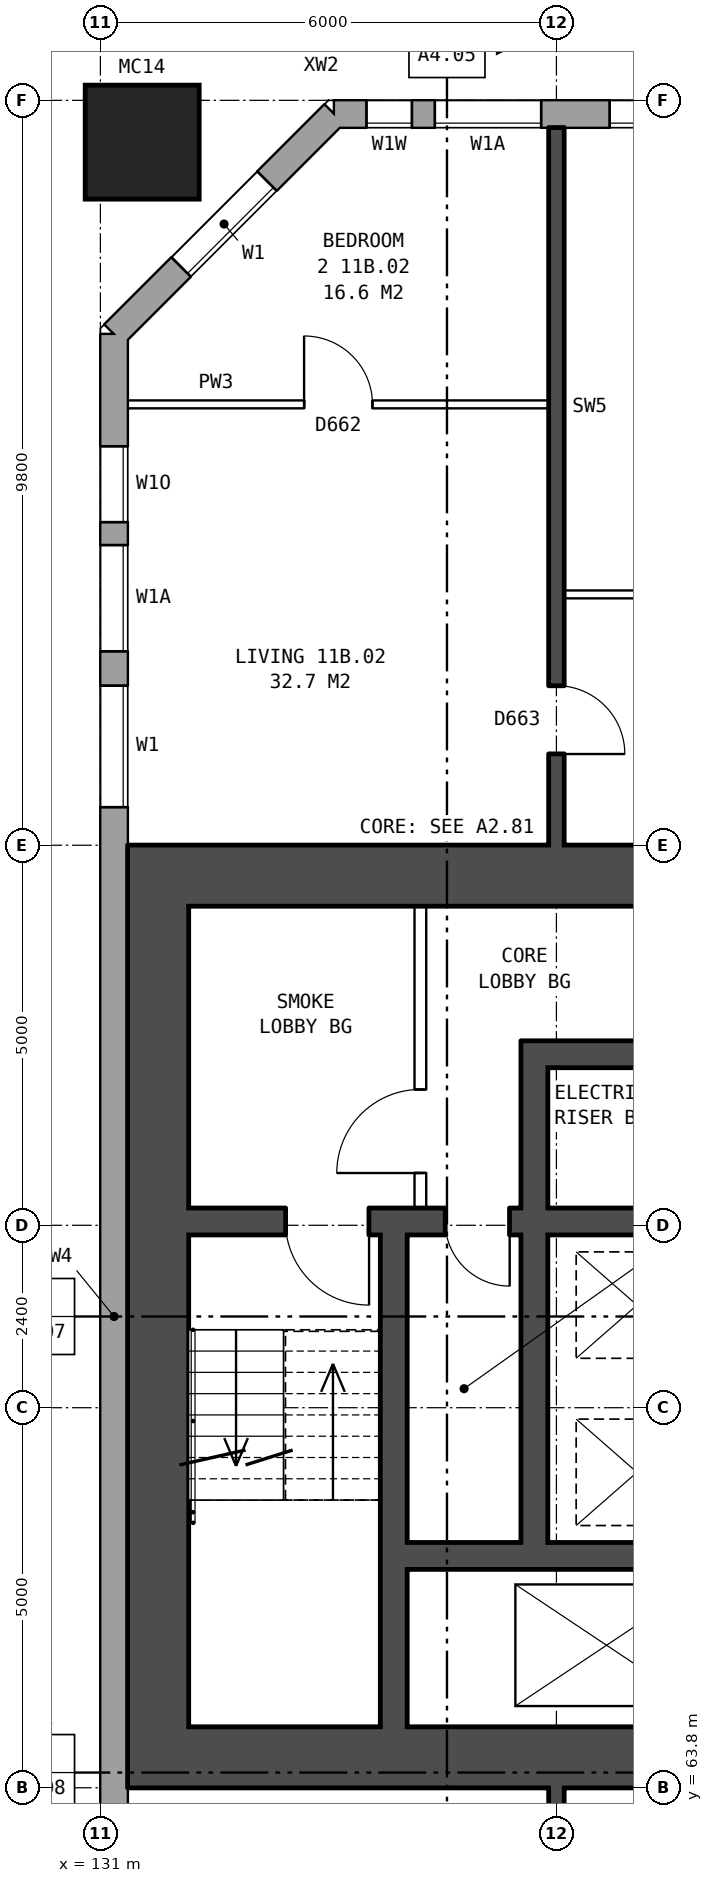
"""IFC4 building model, lengths in metres.
Left out: names, types, materials, properties, quantities, classifications, styles, units other than length and angle.
Written with IfcOpenShell. Run it as: python <this file> out.ifc"""

import sys

from ifc_helpers import new_model, si_unit, direction, frame, frame_2d, origin, origin_2d, place, context, subcontext, project, spatial, rectangle, hollow_rectangle, extrude, element, fill, save


model = new_model("IFC4")
c1 = context("Model", 3, precision=1e-05, world=origin(), true_north=direction((0.0, 1.0)))
c2 = subcontext(c1, "Body", "Model", "MODEL_VIEW")
j1 = project(units=[si_unit("LENGTHUNIT", "METRE"), si_unit("PLANEANGLEUNIT", "RADIAN")], contexts=[c1])
p1 = place(None, origin())
s1 = spatial("IfcSite", under=j1, at=p1, CompositionType="ELEMENT")
p2 = place(p1, origin())
s2 = spatial("IfcBuilding", under=s1, at=p2, CompositionType="ELEMENT")
p3 = place(p2, frame((0.0, 0.0, 44.3)))
s3 = spatial("IfcBuildingStorey", under=s2, at=p3, CompositionType="ELEMENT", Elevation=44.3)
p4 = place(p3, frame((131.55, 85.45, 0.0), z_axis=(0.0, 0.0, 1.0), x_axis=(1.0, 0.0, 0.0)))
e1 = element("IfcColumn", 1, at=p4, inside=s3, PredefinedType="COLUMN", context=c2, shape_type="SweptSolid", body=[
    extrude(hollow_rectangle(XDim=1.5, YDim=1.5, WallThickness=0.08, at=origin_2d()), origin(), (0.0, 0.0, 1.0), 3.1),
])
p5 = place(p3, frame((173.425, 85.82, 0.0), z_axis=(0.0, 0.0, 1.0), x_axis=(-1.0, 0.0, 0.0)))
e2 = element("IfcWall", 2, at=p5, inside=s3, PredefinedType="STANDARD", context=c2, shape_type="SweptSolid", body=[
    extrude(rectangle(XDim=39.351, YDim=0.36, at=frame_2d((19.675, 0.0))), origin(), (0.0, 0.0, 1.0), 2.85),
])
p6 = place(p5, frame((1.125, 0.0, 0.8)))
e3 = element("IfcOpeningElement", 3, at=p6, cuts=e2, PredefinedType="OPENING", context=c2, shape_type="SweptSolid", body=[
    extrude(rectangle(XDim=1.6, YDim=1.8, at=frame_2d((0.8, 0.9))), frame((0.0, 0.19, 0.0), z_axis=(0.0, -1.0, 0.0), x_axis=(1.0, 0.0, 0.0)), (0.0, 0.0, 1.0), 0.38),
])
p7 = place(p5, frame((4.125, 0.0, 0.8)))
e4 = element("IfcOpeningElement", 4, at=p7, cuts=e2, PredefinedType="OPENING", context=c2, shape_type="SweptSolid", body=[
    extrude(rectangle(XDim=1.6, YDim=1.8, at=frame_2d((0.8, 0.9))), frame((0.0, 0.19, 0.0), z_axis=(0.0, -1.0, 0.0), x_axis=(1.0, 0.0, 0.0)), (0.0, 0.0, 1.0), 0.38),
])
p8 = place(p5, frame((7.125, 0.0, 0.8)))
e5 = element("IfcOpeningElement", 5, at=p8, cuts=e2, PredefinedType="OPENING", context=c2, shape_type="SweptSolid", body=[
    extrude(rectangle(XDim=1.6, YDim=1.8, at=frame_2d((0.8, 0.9))), frame((0.0, 0.19, 0.0), z_axis=(0.0, -1.0, 0.0), x_axis=(1.0, 0.0, 0.0)), (0.0, 0.0, 1.0), 0.38),
])
p9 = place(p5, frame((10.125, 0.0, 0.8)))
e6 = element("IfcOpeningElement", 6, at=p9, cuts=e2, PredefinedType="OPENING", context=c2, shape_type="SweptSolid", body=[
    extrude(rectangle(XDim=1.6, YDim=1.8, at=frame_2d((0.8, 0.9))), frame((0.0, 0.19, 0.0), z_axis=(0.0, -1.0, 0.0), x_axis=(1.0, 0.0, 0.0)), (0.0, 0.0, 1.0), 0.38),
])
p10 = place(p5, frame((13.125, 0.0, 0.8)))
e7 = element("IfcOpeningElement", 7, at=p10, cuts=e2, PredefinedType="OPENING", context=c2, shape_type="SweptSolid", body=[
    extrude(rectangle(XDim=1.6, YDim=1.8, at=frame_2d((0.8, 0.9))), frame((0.0, 0.19, 0.0), z_axis=(0.0, -1.0, 0.0), x_axis=(1.0, 0.0, 0.0)), (0.0, 0.0, 1.0), 0.38),
])
p11 = place(p5, frame((16.125, 0.0, 0.8)))
e8 = element("IfcOpeningElement", 8, at=p11, cuts=e2, PredefinedType="OPENING", context=c2, shape_type="SweptSolid", body=[
    extrude(rectangle(XDim=1.6, YDim=1.8, at=frame_2d((0.8, 0.9))), frame((0.0, 0.19, 0.0), z_axis=(0.0, -1.0, 0.0), x_axis=(1.0, 0.0, 0.0)), (0.0, 0.0, 1.0), 0.38),
])
p12 = place(p5, frame((19.125, 0.0, 0.8)))
e9 = element("IfcOpeningElement", 9, at=p12, cuts=e2, PredefinedType="OPENING", context=c2, shape_type="SweptSolid", body=[
    extrude(rectangle(XDim=1.6, YDim=1.8, at=frame_2d((0.8, 0.9))), frame((0.0, 0.19, 0.0), z_axis=(0.0, -1.0, 0.0), x_axis=(1.0, 0.0, 0.0)), (0.0, 0.0, 1.0), 0.38),
])
p13 = place(p5, frame((22.125, 0.0, 0.8)))
e10 = element("IfcOpeningElement", 10, at=p13, cuts=e2, PredefinedType="OPENING", context=c2, shape_type="SweptSolid", body=[
    extrude(rectangle(XDim=1.6, YDim=1.8, at=frame_2d((0.8, 0.9))), frame((0.0, 0.19, 0.0), z_axis=(0.0, -1.0, 0.0), x_axis=(1.0, 0.0, 0.0)), (0.0, 0.0, 1.0), 0.38),
])
p14 = place(p5, frame((25.125, 0.0, 0.8)))
e11 = element("IfcOpeningElement", 11, at=p14, cuts=e2, PredefinedType="OPENING", context=c2, shape_type="SweptSolid", body=[
    extrude(rectangle(XDim=1.6, YDim=1.8, at=frame_2d((0.8, 0.9))), frame((0.0, 0.19, 0.0), z_axis=(0.0, -1.0, 0.0), x_axis=(1.0, 0.0, 0.0)), (0.0, 0.0, 1.0), 0.38),
])
p15 = place(p5, frame((28.125, 0.0, 0.8)))
e12 = element("IfcOpeningElement", 12, at=p15, cuts=e2, PredefinedType="OPENING", context=c2, shape_type="SweptSolid", body=[
    extrude(rectangle(XDim=1.6, YDim=1.8, at=frame_2d((0.8, 0.9))), frame((0.0, 0.19, 0.0), z_axis=(0.0, -1.0, 0.0), x_axis=(1.0, 0.0, 0.0)), (0.0, 0.0, 1.0), 0.38),
])
p16 = place(p5, frame((31.125, 0.0, 0.8)))
e13 = element("IfcOpeningElement", 13, at=p16, cuts=e2, PredefinedType="OPENING", context=c2, shape_type="SweptSolid", body=[
    extrude(rectangle(XDim=1.6, YDim=1.8, at=frame_2d((0.8, 0.9))), frame((0.0, 0.19, 0.0), z_axis=(0.0, -1.0, 0.0), x_axis=(1.0, 0.0, 0.0)), (0.0, 0.0, 1.0), 0.38),
])
p17 = place(p5, frame((34.125, 0.0, 0.8)))
e14 = element("IfcOpeningElement", 14, at=p17, cuts=e2, PredefinedType="OPENING", context=c2, shape_type="SweptSolid", body=[
    extrude(rectangle(XDim=1.6, YDim=1.8, at=frame_2d((0.8, 0.9))), frame((0.0, 0.19, 0.0), z_axis=(0.0, -1.0, 0.0), x_axis=(1.0, 0.0, 0.0)), (0.0, 0.0, 1.0), 0.38),
])
p18 = place(p5, frame((36.625, 0.0, 0.8)))
e15 = element("IfcOpeningElement", 15, at=p18, cuts=e2, PredefinedType="OPENING", context=c2, shape_type="SweptSolid", body=[
    extrude(rectangle(XDim=1.4, YDim=1.8, at=frame_2d((0.7, 0.9))), frame((0.0, 0.19, 0.0), z_axis=(0.0, -1.0, 0.0), x_axis=(1.0, 0.0, 0.0)), (0.0, 0.0, 1.0), 0.38),
])
p19 = place(p5, frame((38.325, 0.0, 0.8)))
e16 = element("IfcOpeningElement", 16, at=p19, cuts=e2, PredefinedType="OPENING", context=c2, shape_type="SweptSolid", body=[
    extrude(rectangle(XDim=0.6, YDim=0.9, at=frame_2d((0.3, 0.45))), frame((0.0, 0.19, 0.0), z_axis=(0.0, -1.0, 0.0), x_axis=(1.0, 0.0, 0.0)), (0.0, 0.0, 1.0), 0.38),
])
p20 = place(p3, frame((134.075, 85.82, 0.0), z_axis=(0.0, 0.0, 1.0), x_axis=(-0.707106781187, -0.707106781187, 0.0)))
e17 = element("IfcWall", 17, at=p20, inside=s3, PredefinedType="STANDARD", context=c2, shape_type="SweptSolid", body=[
    extrude(rectangle(XDim=4.094, YDim=0.36, at=frame_2d((2.047, 0.0))), origin(), (0.0, 0.0, 1.0), 2.85),
])
p21 = place(p20, frame((1.247, 0.0, 0.8)))
e18 = element("IfcOpeningElement", 18, at=p21, cuts=e17, PredefinedType="OPENING", context=c2, shape_type="SweptSolid", body=[
    extrude(rectangle(XDim=1.6, YDim=1.8, at=frame_2d((0.8, 0.9))), frame((0.0, 0.19, 0.0), z_axis=(0.0, -1.0, 0.0), x_axis=(1.0, 0.0, 0.0)), (0.0, 0.0, 1.0), 0.38),
])
p22 = place(p3, frame((131.18, 82.925, 0.0), z_axis=(0.0, 0.0, 1.0), x_axis=(0.0, -1.0, 0.0)))
e19 = element("IfcWall", 19, at=p22, inside=s3, PredefinedType="STANDARD", context=c2, shape_type="SweptSolid", body=[
    extrude(rectangle(XDim=25.851, YDim=0.36, at=frame_2d((12.925, 0.0))), origin(), (0.0, 0.0, 1.0), 2.85),
])
p23 = place(p22, frame((1.475, 0.0, 0.8)))
e20 = element("IfcOpeningElement", 20, at=p23, cuts=e19, PredefinedType="OPENING", context=c2, shape_type="SweptSolid", body=[
    extrude(rectangle(XDim=1.0, YDim=1.2, at=frame_2d((0.5, 0.6))), frame((0.0, 0.19, 0.0), z_axis=(0.0, -1.0, 0.0), x_axis=(1.0, 0.0, 0.0)), (0.0, 0.0, 1.0), 0.38),
])
p24 = place(p22, frame((4.625, 0.0, 0.8)))
e21 = element("IfcOpeningElement", 21, at=p24, cuts=e19, PredefinedType="OPENING", context=c2, shape_type="SweptSolid", body=[
    extrude(rectangle(XDim=1.6, YDim=1.8, at=frame_2d((0.8, 0.9))), frame((0.0, 0.19, 0.0), z_axis=(0.0, -1.0, 0.0), x_axis=(1.0, 0.0, 0.0)), (0.0, 0.0, 1.0), 0.38),
])
p25 = place(p22, frame((19.625, 0.0, 0.8)))
e22 = element("IfcOpeningElement", 22, at=p25, cuts=e19, PredefinedType="OPENING", context=c2, shape_type="SweptSolid", body=[
    extrude(rectangle(XDim=1.6, YDim=1.8, at=frame_2d((0.8, 0.9))), frame((0.0, 0.19, 0.0), z_axis=(0.0, -1.0, 0.0), x_axis=(1.0, 0.0, 0.0)), (0.0, 0.0, 1.0), 0.38),
])
p26 = place(p22, frame((21.525, 0.0, 0.8)))
e23 = element("IfcOpeningElement", 23, at=p26, cuts=e19, PredefinedType="OPENING", context=c2, shape_type="SweptSolid", body=[
    extrude(rectangle(XDim=1.4, YDim=1.8, at=frame_2d((0.7, 0.9))), frame((0.0, 0.19, 0.0), z_axis=(0.0, -1.0, 0.0), x_axis=(1.0, 0.0, 0.0)), (0.0, 0.0, 1.0), 0.38),
])
p27 = place(p22, frame((2.775, 0.0, 0.8)))
e24 = element("IfcOpeningElement", 24, at=p27, cuts=e19, PredefinedType="OPENING", context=c2, shape_type="SweptSolid", body=[
    extrude(rectangle(XDim=1.4, YDim=1.8, at=frame_2d((0.7, 0.9))), frame((0.0, 0.19, 0.0), z_axis=(0.0, -1.0, 0.0), x_axis=(1.0, 0.0, 0.0)), (0.0, 0.0, 1.0), 0.38),
])
p28 = place(p22, frame((23.225, 0.0, 0.8)))
e25 = element("IfcOpeningElement", 25, at=p28, cuts=e19, PredefinedType="OPENING", context=c2, shape_type="SweptSolid", body=[
    extrude(rectangle(XDim=1.0, YDim=1.2, at=frame_2d((0.5, 0.6))), frame((0.0, 0.19, 0.0), z_axis=(0.0, -1.0, 0.0), x_axis=(1.0, 0.0, 0.0)), (0.0, 0.0, 1.0), 0.38),
])
p29 = place(p3, frame((131.76, 64.6, 0.0), z_axis=(0.0, 0.0, 1.0), x_axis=(0.0, 1.0, 0.0)))
e26 = element("IfcWall", 26, at=p29, inside=s3, PredefinedType="SHEAR", context=c2, shape_type="SweptSolid", body=[
    extrude(rectangle(XDim=10.8, YDim=0.8, at=frame_2d((5.4, 0.0))), origin(), (0.0, 0.0, 1.0), 2.85),
])
for number, where, z_axis, x_axis in (
    (27, (139.76, 64.2, 0.0), (0.0, 0.0, 1.0), (-1.0, 0.0, 0.0)),
    (28, (139.76, 75.8, 0.0), (0.0, 0.0, 1.0), (-1.0, 0.0, 0.0)),
):
    element("IfcWall", number, at=place(p3, frame(where, z_axis=z_axis, x_axis=x_axis)), inside=s3, PredefinedType="SHEAR", context=c2, shape_type="SweptSolid", body=[
        extrude(rectangle(XDim=8.4, YDim=0.8, at=frame_2d((4.2, 0.0))), origin(), (0.0, 0.0, 1.0), 2.85),
    ])
p30 = place(p3, frame((138.96, 66.85, 0.0), z_axis=(0.0, 0.0, 1.0), x_axis=(-1.0, 0.0, 0.0)))
e29 = element("IfcWall", 29, at=p30, inside=s3, PredefinedType="SHEAR", context=c2, shape_type="SweptSolid", body=[
    extrude(rectangle(XDim=3.925, YDim=0.35, at=frame_2d((1.962, 0.0))), origin(), (0.0, 0.0, 1.0), 2.85),
])
p31 = place(p3, frame((138.96, 71.25, 0.0), z_axis=(0.0, 0.0, 1.0), x_axis=(-1.0, 0.0, 0.0)))
e30 = element("IfcWall", 30, at=p31, inside=s3, PredefinedType="SHEAR", context=c2, shape_type="SweptSolid", body=[
    extrude(rectangle(XDim=6.8, YDim=0.35, at=frame_2d((3.4, 0.0))), origin(), (0.0, 0.0, 1.0), 2.85),
])
p32 = place(p31, frame((4.425, 0.0, 0.0)))
e31 = element("IfcOpeningElement", 31, at=p32, cuts=e30, PredefinedType="OPENING", context=c2, shape_type="SweptSolid", body=[
    extrude(rectangle(XDim=1.1, YDim=2.1, at=frame_2d((0.55, 1.05))), frame((0.0, 0.185, 0.0), z_axis=(0.0, -1.0, 0.0), x_axis=(1.0, 0.0, 0.0)), (0.0, 0.0, 1.0), 0.37),
])
p33 = place(p31, frame((2.575, 0.0, 0.0)))
e32 = element("IfcOpeningElement", 32, at=p33, cuts=e30, PredefinedType="OPENING", context=c2, shape_type="SweptSolid", body=[
    extrude(rectangle(XDim=0.85, YDim=2.1, at=frame_2d((0.425, 1.05))), frame((0.0, 0.185, 0.0), z_axis=(0.0, -1.0, 0.0), x_axis=(1.0, 0.0, 0.0)), (0.0, 0.0, 1.0), 0.37),
])
p34 = place(p3, frame((138.96, 73.45, 0.0), z_axis=(0.0, 0.0, 1.0), x_axis=(-1.0, 0.0, 0.0)))
e33 = element("IfcWall", 33, at=p34, inside=s3, PredefinedType="SHEAR", context=c2, shape_type="SweptSolid", body=[
    extrude(rectangle(XDim=2.075, YDim=0.35, at=frame_2d((1.038, 0.0))), origin(), (0.0, 0.0, 1.0), 2.85),
])
p35 = place(p3, frame((136.71, 67.025, 0.0), z_axis=(0.0, 0.0, 1.0), x_axis=(0.0, 1.0, 0.0)))
e34 = element("IfcWall", 34, at=p35, inside=s3, PredefinedType="SHEAR", context=c2, shape_type="SweptSolid", body=[
    extrude(rectangle(XDim=4.05, YDim=0.35, at=frame_2d((2.025, 0.0))), origin(), (0.0, 0.0, 1.0), 2.85),
])
p36 = place(p3, frame((136.71, 71.425, 0.0), z_axis=(0.0, 0.0, 1.0), x_axis=(0.0, 1.0, 0.0)))
e35 = element("IfcWall", 35, at=p36, inside=s3, PredefinedType="SHEAR", context=c2, shape_type="SweptSolid", body=[
    extrude(rectangle(XDim=2.2, YDim=0.35, at=frame_2d((1.1, 0.0))), origin(), (0.0, 0.0, 1.0), 2.85),
])
p37 = place(p3, frame((135.21, 71.425, 0.0), z_axis=(0.0, 0.0, 1.0), x_axis=(0.0, 1.0, 0.0)))
e36 = element("IfcWall", 36, at=p37, inside=s3, PredefinedType="PARTITIONING", context=c2, shape_type="SweptSolid", body=[
    extrude(rectangle(XDim=3.975, YDim=0.15, at=frame_2d((1.987, 0.0))), origin(), (0.0, 0.0, 1.0), 2.85),
])
p38 = place(p37, frame((0.462, 0.0, 0.0)))
e37 = element("IfcOpeningElement", 37, at=p38, cuts=e36, PredefinedType="OPENING", context=c2, shape_type="SweptSolid", body=[
    extrude(rectangle(XDim=1.1, YDim=2.1, at=frame_2d((0.55, 1.05))), frame((0.0, 0.085, 0.0), z_axis=(0.0, -1.0, 0.0), x_axis=(1.0, 0.0, 0.0)), (0.0, 0.0, 1.0), 0.17),
])
p39 = place(p3, frame((134.86, 64.6, 0.0), z_axis=(0.0, 0.0, 1.0), x_axis=(0.0, 1.0, 0.0)))
e38 = element("IfcWall", 38, at=p39, inside=s3, PredefinedType="SHEAR", context=c2, shape_type="SweptSolid", body=[
    extrude(rectangle(XDim=6.475, YDim=0.35, at=frame_2d((3.237, 0.0))), origin(), (0.0, 0.0, 1.0), 2.85),
])
p40 = place(p3, frame((137.1, 79.5, 0.0), z_axis=(0.0, 0.0, 1.0), x_axis=(1.0, 0.0, 0.0)))
e39 = element("IfcWall", 39, at=p40, inside=s3, PredefinedType="PARTITIONING", context=c2, shape_type="SweptSolid", body=[
    extrude(rectangle(XDim=5.8, YDim=0.1, at=frame_2d((2.9, 0.0))), origin(), (0.0, 0.0, 1.0), 2.85),
])
p41 = place(p40, frame((1.3, 0.0, 0.0)))
e40 = element("IfcOpeningElement", 40, at=p41, cuts=e39, PredefinedType="OPENING", context=c2, shape_type="SweptSolid", body=[
    extrude(rectangle(XDim=0.9, YDim=2.1, at=frame_2d((0.45, 1.05))), frame((0.0, 0.06, 0.0), z_axis=(0.0, -1.0, 0.0), x_axis=(1.0, 0.0, 0.0)), (0.0, 0.0, 1.0), 0.12),
])
p42 = place(p40, frame((4.2, 0.0, 0.0)))
e41 = element("IfcOpeningElement", 41, at=p42, cuts=e39, PredefinedType="OPENING", context=c2, shape_type="SweptSolid", body=[
    extrude(rectangle(XDim=0.9, YDim=2.1, at=frame_2d((0.45, 1.05))), frame((0.0, 0.06, 0.0), z_axis=(0.0, -1.0, 0.0), x_axis=(1.0, 0.0, 0.0)), (0.0, 0.0, 1.0), 0.12),
])
p43 = place(p3, frame((131.36, 82.0, 0.0), z_axis=(0.0, 0.0, 1.0), x_axis=(1.0, 0.0, 0.0)))
e42 = element("IfcWall", 42, at=p43, inside=s3, PredefinedType="PARTITIONING", context=c2, shape_type="SweptSolid", body=[
    extrude(rectangle(XDim=5.54, YDim=0.1, at=frame_2d((2.77, 0.0))), origin(), (0.0, 0.0, 1.0), 2.85),
])
p44 = place(p43, frame((2.32, 0.0, 0.0)))
e43 = element("IfcOpeningElement", 43, at=p44, cuts=e42, PredefinedType="OPENING", context=c2, shape_type="SweptSolid", body=[
    extrude(rectangle(XDim=0.9, YDim=2.1, at=frame_2d((0.45, 1.05))), frame((0.0, 0.06, 0.0), z_axis=(0.0, -1.0, 0.0), x_axis=(1.0, 0.0, 0.0)), (0.0, 0.0, 1.0), 0.12),
])
p45 = place(p3, frame((137.0, 54.36, 0.0), z_axis=(0.0, 0.0, 1.0), x_axis=(0.0, 1.0, 0.0)))
e44 = element("IfcWall", 44, at=p45, inside=s3, PredefinedType="SOLIDWALL", context=c2, shape_type="SweptSolid", body=[
    extrude(rectangle(XDim=9.44, YDim=0.2, at=frame_2d((4.72, 0.0))), origin(), (0.0, 0.0, 1.0), 2.85),
])
p46 = place(p45, frame((7.04, 0.0, 0.0)))
e45 = element("IfcOpeningElement", 45, at=p46, cuts=e44, PredefinedType="OPENING", context=c2, shape_type="SweptSolid", body=[
    extrude(rectangle(XDim=0.9, YDim=2.1, at=frame_2d((0.45, 1.05))), frame((0.0, 0.11, 0.0), z_axis=(0.0, -1.0, 0.0), x_axis=(1.0, 0.0, 0.0)), (0.0, 0.0, 1.0), 0.22),
])
p47 = place(p3, frame((137.0, 76.2, 0.0), z_axis=(0.0, 0.0, 1.0), x_axis=(0.0, 1.0, 0.0)))
e46 = element("IfcWall", 46, at=p47, inside=s3, PredefinedType="SOLIDWALL", context=c2, shape_type="SweptSolid", body=[
    extrude(rectangle(XDim=9.44, YDim=0.2, at=frame_2d((4.72, 0.0))), origin(), (0.0, 0.0, 1.0), 2.85),
])
p48 = place(p47, frame((1.2, 0.0, 0.0)))
e47 = element("IfcOpeningElement", 47, at=p48, cuts=e46, PredefinedType="OPENING", context=c2, shape_type="SweptSolid", body=[
    extrude(rectangle(XDim=0.9, YDim=2.1, at=frame_2d((0.45, 1.05))), frame((0.0, 0.11, 0.0), z_axis=(0.0, -1.0, 0.0), x_axis=(1.0, 0.0, 0.0)), (0.0, 0.0, 1.0), 0.22),
])
p49 = place(p17, origin())
e48 = element("IfcWindow", 48, at=p49, inside=s3, PartitioningType="SINGLE_PANEL", PredefinedType="WINDOW", context=c2, shape_type="SweptSolid", body=[
    extrude(rectangle(XDim=1.6, YDim=1.8, at=frame_2d((0.8, 0.9))), frame((0.0, 0.15, 0.0), z_axis=(0.0, -1.0, 0.0), x_axis=(1.0, 0.0, 0.0)), (0.0, 0.0, 1.0), 0.06),
])
fill(e14, e48)
p50 = place(p18, origin())
e49 = element("IfcWindow", 49, at=p50, inside=s3, PartitioningType="SINGLE_PANEL", PredefinedType="WINDOW", context=c2, shape_type="SweptSolid", body=[
    extrude(rectangle(XDim=1.4, YDim=1.8, at=frame_2d((0.7, 0.9))), frame((0.0, 0.15, 0.0), z_axis=(0.0, -1.0, 0.0), x_axis=(1.0, 0.0, 0.0)), (0.0, 0.0, 1.0), 0.06),
])
fill(e15, e49)
p51 = place(p21, origin())
e50 = element("IfcWindow", 50, at=p51, inside=s3, PartitioningType="SINGLE_PANEL", PredefinedType="WINDOW", context=c2, shape_type="SweptSolid", body=[
    extrude(rectangle(XDim=1.6, YDim=1.8, at=frame_2d((0.8, 0.9))), frame((0.0, 0.15, 0.0), z_axis=(0.0, -1.0, 0.0), x_axis=(1.0, 0.0, 0.0)), (0.0, 0.0, 1.0), 0.06),
])
fill(e18, e50)
p52 = place(p23, origin())
e51 = element("IfcWindow", 51, at=p52, inside=s3, PartitioningType="SINGLE_PANEL", PredefinedType="WINDOW", context=c2, shape_type="SweptSolid", body=[
    extrude(rectangle(XDim=1.0, YDim=1.2, at=frame_2d((0.5, 0.6))), frame((0.0, 0.15, 0.0), z_axis=(0.0, -1.0, 0.0), x_axis=(1.0, 0.0, 0.0)), (0.0, 0.0, 1.0), 0.06),
])
fill(e20, e51)
p53 = place(p24, origin())
e52 = element("IfcWindow", 52, at=p53, inside=s3, PartitioningType="SINGLE_PANEL", PredefinedType="WINDOW", context=c2, shape_type="SweptSolid", body=[
    extrude(rectangle(XDim=1.6, YDim=1.8, at=frame_2d((0.8, 0.9))), frame((0.0, 0.15, 0.0), z_axis=(0.0, -1.0, 0.0), x_axis=(1.0, 0.0, 0.0)), (0.0, 0.0, 1.0), 0.06),
])
fill(e21, e52)
p54 = place(p38, origin())
e53 = element("IfcDoor", 53, at=p54, inside=s3, OperationType="SINGLE_SWING_LEFT", PredefinedType="DOOR", context=c2, shape_type="SweptSolid", body=[
    extrude(rectangle(XDim=1.1, YDim=2.1, at=frame_2d((0.55, 1.05))), frame((0.0, 0.025, 0.0), z_axis=(0.0, -1.0, 0.0), x_axis=(1.0, 0.0, 0.0)), (0.0, 0.0, 1.0), 0.05),
])
fill(e37, e53)
p55 = place(p32, origin())
e54 = element("IfcDoor", 54, at=p55, inside=s3, OperationType="SINGLE_SWING_LEFT", PredefinedType="DOOR", context=c2, shape_type="SweptSolid", body=[
    extrude(rectangle(XDim=1.1, YDim=2.1, at=frame_2d((0.55, 1.05))), frame((0.0, 0.025, 0.0), z_axis=(0.0, -1.0, 0.0), x_axis=(1.0, 0.0, 0.0)), (0.0, 0.0, 1.0), 0.05),
])
fill(e31, e54)
p56 = place(p33, origin())
e55 = element("IfcDoor", 55, at=p56, inside=s3, OperationType="SINGLE_SWING_LEFT", PredefinedType="DOOR", context=c2, shape_type="SweptSolid", body=[
    extrude(rectangle(XDim=0.85, YDim=2.1, at=frame_2d((0.425, 1.05))), frame((0.0, 0.025, 0.0), z_axis=(0.0, -1.0, 0.0), x_axis=(1.0, 0.0, 0.0)), (0.0, 0.0, 1.0), 0.05),
])
fill(e32, e55)
p57 = place(p44, origin())
e56 = element("IfcDoor", 56, at=p57, inside=s3, OperationType="SINGLE_SWING_LEFT", PredefinedType="DOOR", context=c2, shape_type="SweptSolid", body=[
    extrude(rectangle(XDim=0.9, YDim=2.1, at=frame_2d((0.45, 1.05))), frame((0.0, 0.025, 0.0), z_axis=(0.0, -1.0, 0.0), x_axis=(1.0, 0.0, 0.0)), (0.0, 0.0, 1.0), 0.05),
])
fill(e43, e56)
p58 = place(p48, frame((0.9, 0.0, 0.0), z_axis=(0.0, 0.0, 1.0), x_axis=(-1.0, 0.0, 0.0)))
e57 = element("IfcDoor", 57, at=p58, inside=s3, OperationType="SINGLE_SWING_RIGHT", PredefinedType="DOOR", context=c2, shape_type="SweptSolid", body=[
    extrude(rectangle(XDim=0.9, YDim=2.1, at=frame_2d((0.45, 1.05))), frame((0.0, 0.025, 0.0), z_axis=(0.0, -1.0, 0.0), x_axis=(1.0, 0.0, 0.0)), (0.0, 0.0, 1.0), 0.05),
])
fill(e47, e57)
p59 = place(p19, origin())
e58 = element("IfcWindow", 58, at=p59, inside=s3, PartitioningType="SINGLE_PANEL", PredefinedType="WINDOW", context=c2, shape_type="SweptSolid", body=[
    extrude(rectangle(XDim=0.6, YDim=0.9, at=frame_2d((0.3, 0.45))), frame((0.0, 0.15, 0.0), z_axis=(0.0, -1.0, 0.0), x_axis=(1.0, 0.0, 0.0)), (0.0, 0.0, 1.0), 0.06),
])
fill(e16, e58)
p60 = place(p27, origin())
e59 = element("IfcWindow", 59, at=p60, inside=s3, PartitioningType="SINGLE_PANEL", PredefinedType="WINDOW", context=c2, shape_type="SweptSolid", body=[
    extrude(rectangle(XDim=1.4, YDim=1.8, at=frame_2d((0.7, 0.9))), frame((0.0, 0.15, 0.0), z_axis=(0.0, -1.0, 0.0), x_axis=(1.0, 0.0, 0.0)), (0.0, 0.0, 1.0), 0.06),
])
fill(e24, e59)
save(model, sys.argv[1])
